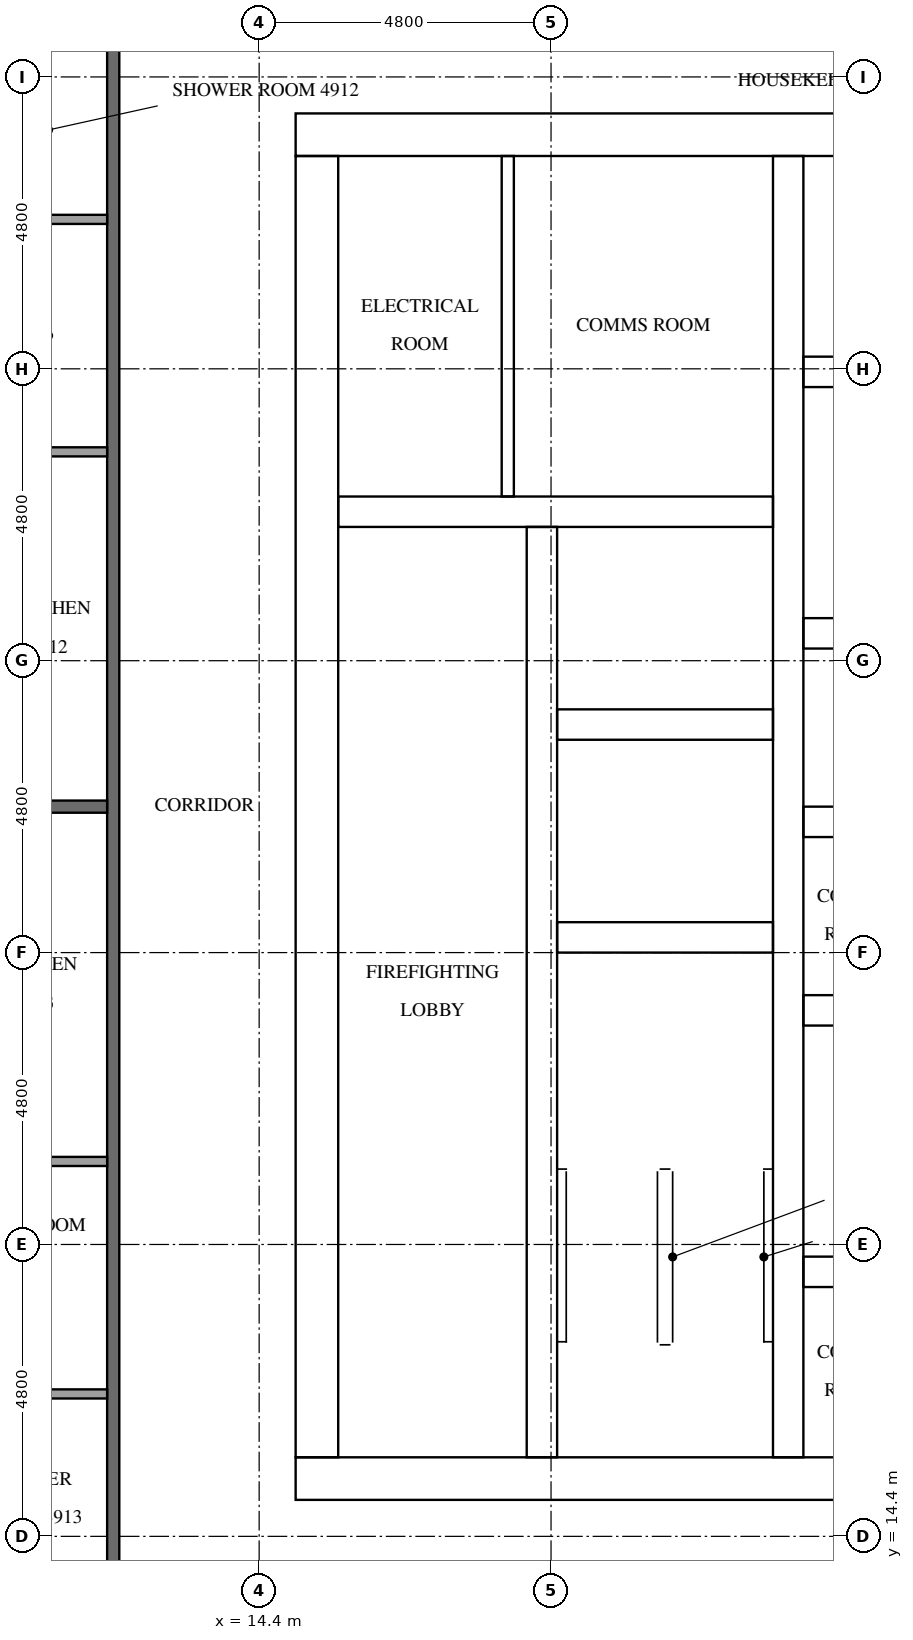
"""IFC4 building model, lengths in metres.
Left out: names, types, materials, properties, quantities, classifications, styles, units other than length and angle.
Written with IfcOpenShell. Run it as: python <this file> out.ifc"""

import sys

from ifc_helpers import new_model, si_unit, direction, frame, frame_2d, origin, place, context, subcontext, project, spatial, rectangle, extrude, element, fill, save


model = new_model("IFC4")
c1 = context("Model", 3, precision=1e-05, world=origin(), true_north=direction((0.0, 1.0)))
c2 = subcontext(c1, "Body", "Model", "MODEL_VIEW")
j1 = project(units=[si_unit("LENGTHUNIT", "METRE"), si_unit("PLANEANGLEUNIT", "RADIAN")], contexts=[c1])
p1 = place(None, origin())
s1 = spatial("IfcSite", under=j1, at=p1, CompositionType="ELEMENT")
p2 = place(p1, origin())
s2 = spatial("IfcBuilding", under=s1, at=p2, CompositionType="ELEMENT")
p3 = place(p2, frame((0.0, 0.0, 189.4)))
s3 = spatial("IfcBuildingStorey", under=s2, at=p3, CompositionType="ELEMENT", Elevation=189.4)
p4 = place(p3, frame((15.0, 15.35, 0.0), z_axis=(0.0, 0.0, 1.0), x_axis=(1.0, 0.0, 0.0)))
e1 = element("IfcWall", 1, at=p4, inside=s3, PredefinedType="SHEAR", context=c2, shape_type="SweptSolid", body=[
    extrude(rectangle(XDim=32.4, YDim=0.7, at=frame_2d((16.2, 0.0))), origin(), (0.0, 0.0, 1.0), 3.2),
])
p5 = place(p4, frame((15.3, 0.0, 0.0)))
e2 = element("IfcOpeningElement", 2, at=p5, cuts=e1, PredefinedType="OPENING", context=c2, shape_type="SweptSolid", body=[
    extrude(rectangle(XDim=1.8, YDim=2.1, at=frame_2d((0.9, 1.05))), frame((0.0, 0.36, 0.0), z_axis=(0.0, -1.0, 0.0), x_axis=(1.0, 0.0, 0.0)), (0.0, 0.0, 1.0), 0.72),
])
p6 = place(p3, frame((15.0, 37.45, 0.0), z_axis=(0.0, 0.0, 1.0), x_axis=(1.0, 0.0, 0.0)))
e3 = element("IfcWall", 3, at=p6, inside=s3, PredefinedType="SHEAR", context=c2, shape_type="SweptSolid", body=[
    extrude(rectangle(XDim=32.4, YDim=0.7, at=frame_2d((16.2, 0.0))), origin(), (0.0, 0.0, 1.0), 3.2),
])
p7 = place(p6, frame((15.3, 0.0, 0.0)))
e4 = element("IfcOpeningElement", 4, at=p7, cuts=e3, PredefinedType="OPENING", context=c2, shape_type="SweptSolid", body=[
    extrude(rectangle(XDim=1.8, YDim=2.1, at=frame_2d((0.9, 1.05))), frame((0.0, 0.36, 0.0), z_axis=(0.0, -1.0, 0.0), x_axis=(1.0, 0.0, 0.0)), (0.0, 0.0, 1.0), 0.72),
])
p8 = place(p6, frame((1.544, 0.0, 0.0)))
e5 = element("IfcOpeningElement", 5, at=p8, cuts=e3, PredefinedType="OPENING", context=c2, shape_type="SweptSolid", body=[
    extrude(rectangle(XDim=1.0, YDim=2.1, at=frame_2d((0.5, 1.05))), frame((0.0, 0.36, 0.0), z_axis=(0.0, -1.0, 0.0), x_axis=(1.0, 0.0, 0.0)), (0.0, 0.0, 1.0), 0.72),
])
p9 = place(p6, frame((5.219, 0.0, 0.0)))
e6 = element("IfcOpeningElement", 6, at=p9, cuts=e3, PredefinedType="OPENING", context=c2, shape_type="SweptSolid", body=[
    extrude(rectangle(XDim=1.0, YDim=2.1, at=frame_2d((0.5, 1.05))), frame((0.0, 0.36, 0.0), z_axis=(0.0, -1.0, 0.0), x_axis=(1.0, 0.0, 0.0)), (0.0, 0.0, 1.0), 0.72),
])
p10 = place(p3, frame((15.35, 15.7, 0.0), z_axis=(0.0, 0.0, 1.0), x_axis=(0.0, 1.0, 0.0)))
e7 = element("IfcWall", 7, at=p10, inside=s3, PredefinedType="SHEAR", context=c2, shape_type="SweptSolid", body=[
    extrude(rectangle(XDim=21.4, YDim=0.7, at=frame_2d((10.7, 0.0))), origin(), (0.0, 0.0, 1.0), 3.2),
])
p11 = place(p10, frame((5.06, 0.0, 0.0)))
e8 = element("IfcOpeningElement", 8, at=p11, cuts=e7, PredefinedType="OPENING", context=c2, shape_type="SweptSolid", body=[
    extrude(rectangle(XDim=1.2, YDim=2.1, at=frame_2d((0.6, 1.05))), frame((0.0, 0.36, 0.0), z_axis=(0.0, -1.0, 0.0), x_axis=(1.0, 0.0, 0.0)), (0.0, 0.0, 1.0), 0.72),
])
p12 = place(p3, frame((19.05, 15.7, 0.0), z_axis=(0.0, 0.0, 1.0), x_axis=(0.0, 1.0, 0.0)))
e9 = element("IfcWall", 9, at=p12, inside=s3, PredefinedType="SHEAR", context=c2, shape_type="SweptSolid", body=[
    extrude(rectangle(XDim=15.3, YDim=0.5, at=frame_2d((7.65, 0.0))), origin(), (0.0, 0.0, 1.0), 3.2),
])
p13 = place(p12, frame((9.75, 0.0, 0.0)))
e10 = element("IfcOpeningElement", 10, at=p13, cuts=e9, PredefinedType="OPENING", context=c2, shape_type="SweptSolid", body=[
    extrude(rectangle(XDim=1.1, YDim=2.1, at=frame_2d((0.55, 1.05))), frame((0.0, 0.26, 0.0), z_axis=(0.0, -1.0, 0.0), x_axis=(1.0, 0.0, 0.0)), (0.0, 0.0, 1.0), 0.52),
])
p14 = place(p12, frame((13.25, 0.0, 0.0)))
e11 = element("IfcOpeningElement", 11, at=p14, cuts=e9, PredefinedType="OPENING", context=c2, shape_type="SweptSolid", body=[
    extrude(rectangle(XDim=1.1, YDim=2.1, at=frame_2d((0.55, 1.05))), frame((0.0, 0.26, 0.0), z_axis=(0.0, -1.0, 0.0), x_axis=(1.0, 0.0, 0.0)), (0.0, 0.0, 1.0), 0.52),
])
p15 = place(p12, frame((0.5, 0.0, 0.0)))
e12 = element("IfcOpeningElement", 12, at=p15, cuts=e9, PredefinedType="OPENING", context=c2, shape_type="SweptSolid", body=[
    extrude(rectangle(XDim=1.2, YDim=2.1, at=frame_2d((0.6, 1.05))), frame((0.0, 0.26, 0.0), z_axis=(0.0, -1.0, 0.0), x_axis=(1.0, 0.0, 0.0)), (0.0, 0.0, 1.0), 0.52),
])
p16 = place(p3, frame((23.1, 15.7, 0.0), z_axis=(0.0, 0.0, 1.0), x_axis=(0.0, 1.0, 0.0)))
e13 = element("IfcWall", 13, at=p16, inside=s3, PredefinedType="SHEAR", context=c2, shape_type="SweptSolid", body=[
    extrude(rectangle(XDim=21.4, YDim=0.5, at=frame_2d((10.7, 0.0))), origin(), (0.0, 0.0, 1.0), 3.2),
])
for number, where, z_axis, x_axis in (
    (14, (19.3, 24.25, 0.0), (0.0, 0.0, 1.0), (1.0, 0.0, 0.0)),
    (15, (19.3, 27.75, 0.0), (0.0, 0.0, 1.0), (1.0, 0.0, 0.0)),
):
    element("IfcWall", number, at=place(p3, frame(where, z_axis=z_axis, x_axis=x_axis)), inside=s3, PredefinedType="SHEAR", context=c2, shape_type="SweptSolid", body=[
        extrude(rectangle(XDim=3.55, YDim=0.5, at=frame_2d((1.775, 0.0))), origin(), (0.0, 0.0, 1.0), 3.2),
    ])
p17 = place(p3, frame((15.7, 31.25, 0.0), z_axis=(0.0, 0.0, 1.0), x_axis=(1.0, 0.0, 0.0)))
e16 = element("IfcWall", 16, at=p17, inside=s3, PredefinedType="SHEAR", context=c2, shape_type="SweptSolid", body=[
    extrude(rectangle(XDim=7.15, YDim=0.5, at=frame_2d((3.575, 0.0))), origin(), (0.0, 0.0, 1.0), 3.2),
])
p18 = place(p3, frame((23.35, 18.75, 0.0), z_axis=(0.0, 0.0, 1.0), x_axis=(1.0, 0.0, 0.0)))
e17 = element("IfcWall", 17, at=p18, inside=s3, PredefinedType="SHEAR", context=c2, shape_type="SweptSolid", body=[
    extrude(rectangle(XDim=5.6, YDim=0.5, at=frame_2d((2.8, 0.0))), origin(), (0.0, 0.0, 1.0), 3.2),
])
p19 = place(p18, frame((0.317, 0.0, 0.0)))
e18 = element("IfcOpeningElement", 18, at=p19, cuts=e17, PredefinedType="OPENING", context=c2, shape_type="SweptSolid", body=[
    extrude(rectangle(XDim=1.0, YDim=2.1, at=frame_2d((0.5, 1.05))), frame((0.0, 0.26, 0.0), z_axis=(0.0, -1.0, 0.0), x_axis=(1.0, 0.0, 0.0)), (0.0, 0.0, 1.0), 0.52),
])
p20 = place(p18, frame((2.967, 0.0, 0.0)))
e19 = element("IfcOpeningElement", 19, at=p20, cuts=e17, PredefinedType="OPENING", context=c2, shape_type="SweptSolid", body=[
    extrude(rectangle(XDim=1.0, YDim=2.1, at=frame_2d((0.5, 1.05))), frame((0.0, 0.26, 0.0), z_axis=(0.0, -1.0, 0.0), x_axis=(1.0, 0.0, 0.0)), (0.0, 0.0, 1.0), 0.52),
])
p21 = place(p3, frame((23.35, 23.05, 0.0), z_axis=(0.0, 0.0, 1.0), x_axis=(1.0, 0.0, 0.0)))
e20 = element("IfcWall", 20, at=p21, inside=s3, PredefinedType="SHEAR", context=c2, shape_type="SweptSolid", body=[
    extrude(rectangle(XDim=15.7, YDim=0.5, at=frame_2d((7.85, 0.0))), origin(), (0.0, 0.0, 1.0), 3.2),
])
p22 = place(p21, frame((0.317, 0.0, 0.0)))
e21 = element("IfcOpeningElement", 21, at=p22, cuts=e20, PredefinedType="OPENING", context=c2, shape_type="SweptSolid", body=[
    extrude(rectangle(XDim=1.0, YDim=2.1, at=frame_2d((0.5, 1.05))), frame((0.0, 0.26, 0.0), z_axis=(0.0, -1.0, 0.0), x_axis=(1.0, 0.0, 0.0)), (0.0, 0.0, 1.0), 0.52),
])
p23 = place(p21, frame((2.967, 0.0, 0.0)))
e22 = element("IfcOpeningElement", 22, at=p23, cuts=e20, PredefinedType="OPENING", context=c2, shape_type="SweptSolid", body=[
    extrude(rectangle(XDim=1.0, YDim=2.1, at=frame_2d((0.5, 1.05))), frame((0.0, 0.26, 0.0), z_axis=(0.0, -1.0, 0.0), x_axis=(1.0, 0.0, 0.0)), (0.0, 0.0, 1.0), 0.52),
])
p24 = place(p21, frame((10.917, 0.0, 0.0)))
e23 = element("IfcOpeningElement", 23, at=p24, cuts=e20, PredefinedType="OPENING", context=c2, shape_type="SweptSolid", body=[
    extrude(rectangle(XDim=1.0, YDim=2.1, at=frame_2d((0.5, 1.05))), frame((0.0, 0.26, 0.0), z_axis=(0.0, -1.0, 0.0), x_axis=(1.0, 0.0, 0.0)), (0.0, 0.0, 1.0), 0.52),
])
p25 = place(p21, frame((13.567, 0.0, 0.0)))
e24 = element("IfcOpeningElement", 24, at=p25, cuts=e20, PredefinedType="OPENING", context=c2, shape_type="SweptSolid", body=[
    extrude(rectangle(XDim=1.0, YDim=2.1, at=frame_2d((0.5, 1.05))), frame((0.0, 0.26, 0.0), z_axis=(0.0, -1.0, 0.0), x_axis=(1.0, 0.0, 0.0)), (0.0, 0.0, 1.0), 0.52),
])
p26 = place(p3, frame((23.35, 26.15, 0.0), z_axis=(0.0, 0.0, 1.0), x_axis=(1.0, 0.0, 0.0)))
e25 = element("IfcWall", 25, at=p26, inside=s3, PredefinedType="SHEAR", context=c2, shape_type="SweptSolid", body=[
    extrude(rectangle(XDim=15.7, YDim=0.5, at=frame_2d((7.85, 0.0))), origin(), (0.0, 0.0, 1.0), 3.2),
])
p27 = place(p3, frame((23.35, 29.25, 0.0), z_axis=(0.0, 0.0, 1.0), x_axis=(1.0, 0.0, 0.0)))
e26 = element("IfcWall", 26, at=p27, inside=s3, PredefinedType="SHEAR", context=c2, shape_type="SweptSolid", body=[
    extrude(rectangle(XDim=15.7, YDim=0.5, at=frame_2d((7.85, 0.0))), origin(), (0.0, 0.0, 1.0), 3.2),
])
p28 = place(p27, frame((0.675, 0.0, 0.0)))
e27 = element("IfcOpeningElement", 27, at=p28, cuts=e26, PredefinedType="OPENING", context=c2, shape_type="SweptSolid", body=[
    extrude(rectangle(XDim=1.1, YDim=2.1, at=frame_2d((0.55, 1.05))), frame((0.0, 0.26, 0.0), z_axis=(0.0, -1.0, 0.0), x_axis=(1.0, 0.0, 0.0)), (0.0, 0.0, 1.0), 0.52),
])
p29 = place(p27, frame((3.325, 0.0, 0.0)))
e28 = element("IfcOpeningElement", 28, at=p29, cuts=e26, PredefinedType="OPENING", context=c2, shape_type="SweptSolid", body=[
    extrude(rectangle(XDim=1.1, YDim=2.1, at=frame_2d((0.55, 1.05))), frame((0.0, 0.26, 0.0), z_axis=(0.0, -1.0, 0.0), x_axis=(1.0, 0.0, 0.0)), (0.0, 0.0, 1.0), 0.52),
])
p30 = place(p27, frame((5.975, 0.0, 0.0)))
e29 = element("IfcOpeningElement", 29, at=p30, cuts=e26, PredefinedType="OPENING", context=c2, shape_type="SweptSolid", body=[
    extrude(rectangle(XDim=1.1, YDim=2.1, at=frame_2d((0.55, 1.05))), frame((0.0, 0.26, 0.0), z_axis=(0.0, -1.0, 0.0), x_axis=(1.0, 0.0, 0.0)), (0.0, 0.0, 1.0), 0.52),
])
p31 = place(p27, frame((8.625, 0.0, 0.0)))
e30 = element("IfcOpeningElement", 30, at=p31, cuts=e26, PredefinedType="OPENING", context=c2, shape_type="SweptSolid", body=[
    extrude(rectangle(XDim=1.1, YDim=2.1, at=frame_2d((0.55, 1.05))), frame((0.0, 0.26, 0.0), z_axis=(0.0, -1.0, 0.0), x_axis=(1.0, 0.0, 0.0)), (0.0, 0.0, 1.0), 0.52),
])
p32 = place(p27, frame((11.275, 0.0, 0.0)))
e31 = element("IfcOpeningElement", 31, at=p32, cuts=e26, PredefinedType="OPENING", context=c2, shape_type="SweptSolid", body=[
    extrude(rectangle(XDim=1.1, YDim=2.1, at=frame_2d((0.55, 1.05))), frame((0.0, 0.26, 0.0), z_axis=(0.0, -1.0, 0.0), x_axis=(1.0, 0.0, 0.0)), (0.0, 0.0, 1.0), 0.52),
])
p33 = place(p27, frame((13.925, 0.0, 0.0)))
e32 = element("IfcOpeningElement", 32, at=p33, cuts=e26, PredefinedType="OPENING", context=c2, shape_type="SweptSolid", body=[
    extrude(rectangle(XDim=1.1, YDim=2.1, at=frame_2d((0.55, 1.05))), frame((0.0, 0.26, 0.0), z_axis=(0.0, -1.0, 0.0), x_axis=(1.0, 0.0, 0.0)), (0.0, 0.0, 1.0), 0.52),
])
p34 = place(p3, frame((23.35, 33.55, 0.0), z_axis=(0.0, 0.0, 1.0), x_axis=(1.0, 0.0, 0.0)))
e33 = element("IfcWall", 33, at=p34, inside=s3, PredefinedType="SHEAR", context=c2, shape_type="SweptSolid", body=[
    extrude(rectangle(XDim=5.6, YDim=0.5, at=frame_2d((2.8, 0.0))), origin(), (0.0, 0.0, 1.0), 3.2),
])
p35 = place(p34, frame((0.164, 0.0, 0.0)))
e34 = element("IfcOpeningElement", 34, at=p35, cuts=e33, PredefinedType="OPENING", context=c2, shape_type="SweptSolid", body=[
    extrude(rectangle(XDim=1.0, YDim=2.1, at=frame_2d((0.5, 1.05))), frame((0.0, 0.26, 0.0), z_axis=(0.0, -1.0, 0.0), x_axis=(1.0, 0.0, 0.0)), (0.0, 0.0, 1.0), 0.52),
])
p36 = place(p34, frame((2.814, 0.0, 0.0)))
e35 = element("IfcOpeningElement", 35, at=p36, cuts=e33, PredefinedType="OPENING", context=c2, shape_type="SweptSolid", body=[
    extrude(rectangle(XDim=1.0, YDim=2.1, at=frame_2d((0.5, 1.05))), frame((0.0, 0.26, 0.0), z_axis=(0.0, -1.0, 0.0), x_axis=(1.0, 0.0, 0.0)), (0.0, 0.0, 1.0), 0.52),
])
p37 = place(p3, frame((18.489, 31.5, 0.0), z_axis=(0.0, 0.0, 1.0), x_axis=(0.0, 1.0, 0.0)))
e36 = element("IfcWall", 36, at=p37, inside=s3, PredefinedType="PARTITIONING", context=c2, shape_type="SweptSolid", body=[
    extrude(rectangle(XDim=5.6, YDim=0.2, at=frame_2d((2.8, 0.0))), origin(), (0.0, 0.0, 1.0), 3.2),
])
p38 = place(p3, frame((12.0, 12.1, 0.0), z_axis=(0.0, 0.0, 1.0), x_axis=(0.0, 1.0, 0.0)))
e37 = element("IfcWall", 37, at=p38, inside=s3, PredefinedType="PARTITIONING", context=c2, shape_type="SweptSolid", body=[
    extrude(rectangle(XDim=28.6, YDim=0.2, at=frame_2d((14.3, 0.0))), origin(), (0.0, 0.0, 1.0), 3.2),
])
p39 = place(p38, frame((27.275, 0.0, 0.0)))
e38 = element("IfcOpeningElement", 38, at=p39, cuts=e37, PredefinedType="OPENING", context=c2, shape_type="SweptSolid", body=[
    extrude(rectangle(XDim=1.0, YDim=2.1, at=frame_2d((0.5, 1.05))), frame((0.0, 0.11, 0.0), z_axis=(0.0, -1.0, 0.0), x_axis=(1.0, 0.0, 0.0)), (0.0, 0.0, 1.0), 0.22),
])
p40 = place(p38, frame((0.325, 0.0, 0.0)))
e39 = element("IfcOpeningElement", 39, at=p40, cuts=e37, PredefinedType="OPENING", context=c2, shape_type="SweptSolid", body=[
    extrude(rectangle(XDim=1.0, YDim=2.1, at=frame_2d((0.5, 1.05))), frame((0.0, 0.11, 0.0), z_axis=(0.0, -1.0, 0.0), x_axis=(1.0, 0.0, 0.0)), (0.0, 0.0, 1.0), 0.22),
])
p41 = place(p3, frame((4.9, 26.4, 0.0), z_axis=(0.0, 0.0, 1.0), x_axis=(1.0, 0.0, 0.0)))
e40 = element("IfcWall", 40, at=p41, inside=s3, PredefinedType="PARTITIONING", context=c2, shape_type="SweptSolid", body=[
    extrude(rectangle(XDim=7.0, YDim=0.2, at=frame_2d((3.5, 0.0))), origin(), (0.0, 0.0, 1.0), 3.2),
])
for number, where, z_axis, x_axis in (
    (41, (11.9, 36.058, 0.0), (0.0, 0.0, 1.0), (-1.0, 0.0, 0.0)),
    (42, (11.9, 32.235, 0.0), (0.0, 0.0, 1.0), (-1.0, 0.0, 0.0)),
):
    element("IfcWall", number, at=place(p3, frame(where, z_axis=z_axis, x_axis=x_axis)), inside=s3, PredefinedType="PARTITIONING", context=c2, shape_type="SweptSolid", body=[
        extrude(rectangle(XDim=1.925, YDim=0.15, at=frame_2d((0.962, 0.0))), origin(), (0.0, 0.0, 1.0), 3.2),
    ])
for number, where, z_axis, x_axis in (
    (43, (11.9, 16.742, 0.0), (0.0, 0.0, 1.0), (-1.0, 0.0, 0.0)),
    (44, (11.9, 20.565, 0.0), (0.0, 0.0, 1.0), (-1.0, 0.0, 0.0)),
):
    element("IfcWall", number, at=place(p3, frame(where, z_axis=z_axis, x_axis=x_axis)), inside=s3, PredefinedType="PARTITIONING", context=c2, shape_type="SweptSolid", body=[
        extrude(rectangle(XDim=2.375, YDim=0.15, at=frame_2d((1.188, 0.0))), origin(), (0.0, 0.0, 1.0), 3.2),
    ])
p42 = place(p13, origin())
e45 = element("IfcDoor", 45, at=p42, inside=s3, OperationType="DOUBLE_DOOR_SLIDING", PredefinedType="DOOR", context=c2, shape_type="SweptSolid", body=[
    extrude(rectangle(XDim=1.1, YDim=2.1, at=frame_2d((0.55, 1.05))), frame((0.0, 0.025, 0.0), z_axis=(0.0, -1.0, 0.0), x_axis=(1.0, 0.0, 0.0)), (0.0, 0.0, 1.0), 0.05),
])
fill(e10, e45)
p43 = place(p14, origin())
e46 = element("IfcDoor", 46, at=p43, inside=s3, OperationType="DOUBLE_DOOR_SLIDING", PredefinedType="DOOR", context=c2, shape_type="SweptSolid", body=[
    extrude(rectangle(XDim=1.1, YDim=2.1, at=frame_2d((0.55, 1.05))), frame((0.0, 0.025, 0.0), z_axis=(0.0, -1.0, 0.0), x_axis=(1.0, 0.0, 0.0)), (0.0, 0.0, 1.0), 0.05),
])
fill(e11, e46)
p44 = place(p15, frame((1.2, 0.0, 0.0), z_axis=(0.0, 0.0, 1.0), x_axis=(-1.0, 0.0, 0.0)))
e47 = element("IfcDoor", 47, at=p44, inside=s3, OperationType="SINGLE_SWING_LEFT", PredefinedType="DOOR", context=c2, shape_type="SweptSolid", body=[
    extrude(rectangle(XDim=1.2, YDim=2.1, at=frame_2d((0.6, 1.05))), frame((0.0, 0.025, 0.0), z_axis=(0.0, -1.0, 0.0), x_axis=(1.0, 0.0, 0.0)), (0.0, 0.0, 1.0), 0.05),
])
fill(e12, e47)
p45 = place(p11, frame((1.2, 0.0, 0.0), z_axis=(0.0, 0.0, 1.0), x_axis=(-1.0, 0.0, 0.0)))
e48 = element("IfcDoor", 48, at=p45, inside=s3, OperationType="SINGLE_SWING_RIGHT", PredefinedType="DOOR", context=c2, shape_type="SweptSolid", body=[
    extrude(rectangle(XDim=1.2, YDim=2.1, at=frame_2d((0.6, 1.05))), frame((0.0, 0.025, 0.0), z_axis=(0.0, -1.0, 0.0), x_axis=(1.0, 0.0, 0.0)), (0.0, 0.0, 1.0), 0.05),
])
fill(e8, e48)
p46 = place(p8, origin())
e49 = element("IfcDoor", 49, at=p46, inside=s3, OperationType="SINGLE_SWING_RIGHT", PredefinedType="DOOR", context=c2, shape_type="SweptSolid", body=[
    extrude(rectangle(XDim=1.0, YDim=2.1, at=frame_2d((0.5, 1.05))), frame((0.0, 0.025, 0.0), z_axis=(0.0, -1.0, 0.0), x_axis=(1.0, 0.0, 0.0)), (0.0, 0.0, 1.0), 0.05),
])
fill(e5, e49)
p47 = place(p9, origin())
e50 = element("IfcDoor", 50, at=p47, inside=s3, OperationType="SINGLE_SWING_LEFT", PredefinedType="DOOR", context=c2, shape_type="SweptSolid", body=[
    extrude(rectangle(XDim=1.0, YDim=2.1, at=frame_2d((0.5, 1.05))), frame((0.0, 0.025, 0.0), z_axis=(0.0, -1.0, 0.0), x_axis=(1.0, 0.0, 0.0)), (0.0, 0.0, 1.0), 0.05),
])
fill(e6, e50)
p48 = place(p22, frame((1.0, 0.0, 0.0), z_axis=(0.0, 0.0, 1.0), x_axis=(-1.0, 0.0, 0.0)))
e51 = element("IfcDoor", 51, at=p48, inside=s3, OperationType="SINGLE_SWING_RIGHT", PredefinedType="DOOR", context=c2, shape_type="SweptSolid", body=[
    extrude(rectangle(XDim=1.0, YDim=2.1, at=frame_2d((0.5, 1.05))), frame((0.0, 0.025, 0.0), z_axis=(0.0, -1.0, 0.0), x_axis=(1.0, 0.0, 0.0)), (0.0, 0.0, 1.0), 0.05),
])
fill(e21, e51)
p49 = place(p19, origin())
e52 = element("IfcDoor", 52, at=p49, inside=s3, OperationType="SINGLE_SWING_RIGHT", PredefinedType="DOOR", context=c2, shape_type="SweptSolid", body=[
    extrude(rectangle(XDim=1.0, YDim=2.1, at=frame_2d((0.5, 1.05))), frame((0.0, 0.025, 0.0), z_axis=(0.0, -1.0, 0.0), x_axis=(1.0, 0.0, 0.0)), (0.0, 0.0, 1.0), 0.05),
])
fill(e18, e52)
p50 = place(p35, frame((1.0, 0.0, 0.0), z_axis=(0.0, 0.0, 1.0), x_axis=(-1.0, 0.0, 0.0)))
e53 = element("IfcDoor", 53, at=p50, inside=s3, OperationType="SINGLE_SWING_RIGHT", PredefinedType="DOOR", context=c2, shape_type="SweptSolid", body=[
    extrude(rectangle(XDim=1.0, YDim=2.1, at=frame_2d((0.5, 1.05))), frame((0.0, 0.025, 0.0), z_axis=(0.0, -1.0, 0.0), x_axis=(1.0, 0.0, 0.0)), (0.0, 0.0, 1.0), 0.05),
])
fill(e34, e53)
save(model, sys.argv[1])
